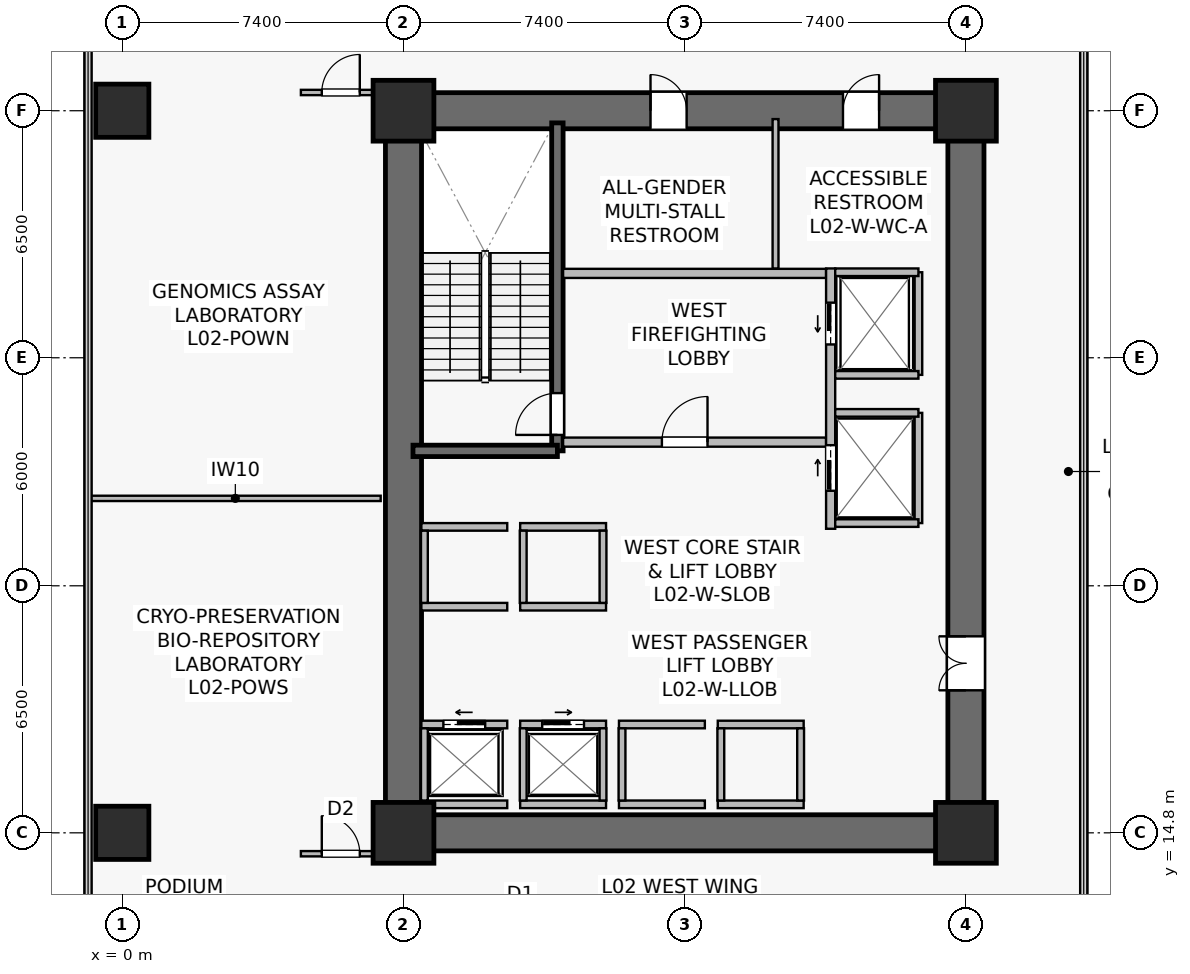
"""IFC4 building model, lengths in metres.
Left out: names, types, materials, properties, quantities, classifications, styles, units other than length and angle.
Written with IfcOpenShell. Run it as: python <this file> out.ifc"""

import sys

from ifc_helpers import new_model, si_unit, direction, frame, frame_2d, origin, origin_2d, place, context, subcontext, project, spatial, rectangle, extrude, source, transform, mapped, element, fill, save


model = new_model("IFC4")
c1 = context("Model", 3, precision=1e-05, world=origin(), true_north=direction((0.0, 1.0)))
c2 = subcontext(c1, "Body", "Model", "MODEL_VIEW")
j1 = project(units=[si_unit("LENGTHUNIT", "METRE"), si_unit("PLANEANGLEUNIT", "RADIAN")], contexts=[c1])
p1 = place(None, origin())
s1 = spatial("IfcSite", under=j1, at=p1, CompositionType="ELEMENT")
p2 = place(p1, origin())
s2 = spatial("IfcBuilding", under=s1, at=p2, CompositionType="ELEMENT")
p3 = place(p2, frame((0.0, 0.0, 5.4)))
s3 = spatial("IfcBuildingStorey", under=s2, at=p3, CompositionType="ELEMENT", Elevation=5.4)
p4 = place(p3, frame((6.925, 14.8, 0.0), z_axis=(0.0, 0.0, 1.0), x_axis=(1.0, 0.0, 0.0)))
e1 = element("IfcWall", 1, at=p4, inside=s3, PredefinedType="SHEAR", context=c2, shape_type="SweptSolid", body=[
    extrude(rectangle(XDim=15.75, YDim=0.95, at=frame_2d((7.875, 0.0))), origin(), (0.0, 0.0, 1.0), 4.45),
])
p5 = place(p3, frame((6.925, 33.8, 0.0), z_axis=(0.0, 0.0, 1.0), x_axis=(1.0, 0.0, 0.0)))
e2 = element("IfcWall", 2, at=p5, inside=s3, PredefinedType="SHEAR", context=c2, shape_type="SweptSolid", body=[
    extrude(rectangle(XDim=15.75, YDim=0.95, at=frame_2d((7.875, 0.0))), origin(), (0.0, 0.0, 1.0), 4.45),
])
p6 = place(p5, frame((6.975, 0.0, 0.0)))
e3 = element("IfcOpeningElement", 3, at=p6, cuts=e2, PredefinedType="OPENING", context=c2, shape_type="SweptSolid", body=[
    extrude(rectangle(XDim=0.95, YDim=2.15, at=frame_2d((0.475, 1.075))), frame((0.0, 0.485, 0.0), z_axis=(0.0, -1.0, 0.0), x_axis=(1.0, 0.0, 0.0)), (0.0, 0.0, 1.0), 0.97),
])
p7 = place(p5, frame((12.04, 0.0, 0.0)))
e4 = element("IfcOpeningElement", 4, at=p7, cuts=e2, PredefinedType="OPENING", context=c2, shape_type="SweptSolid", body=[
    extrude(rectangle(XDim=0.95, YDim=2.15, at=frame_2d((0.475, 1.075))), frame((0.0, 0.485, 0.0), z_axis=(0.0, -1.0, 0.0), x_axis=(1.0, 0.0, 0.0)), (0.0, 0.0, 1.0), 0.97),
])
p8 = place(p3, frame((7.4, 15.275, 0.0), z_axis=(0.0, 0.0, 1.0), x_axis=(0.0, 1.0, 0.0)))
e5 = element("IfcWall", 5, at=p8, inside=s3, PredefinedType="SHEAR", context=c2, shape_type="SweptSolid", body=[
    extrude(rectangle(XDim=18.05, YDim=0.95, at=frame_2d((9.025, 0.0))), origin(), (0.0, 0.0, 1.0), 4.45),
])
p9 = place(p3, frame((22.2, 15.275, 0.0), z_axis=(0.0, 0.0, 1.0), x_axis=(0.0, 1.0, 0.0)))
e6 = element("IfcWall", 6, at=p9, inside=s3, PredefinedType="SHEAR", context=c2, shape_type="SweptSolid", body=[
    extrude(rectangle(XDim=18.05, YDim=0.95, at=frame_2d((9.025, 0.0))), origin(), (0.0, 0.0, 1.0), 4.45),
])
p10 = place(p9, frame((3.275, 0.0, 0.0)))
e7 = element("IfcOpeningElement", 7, at=p10, cuts=e6, PredefinedType="OPENING", context=c2, shape_type="SweptSolid", body=[
    extrude(rectangle(XDim=1.42, YDim=2.2, at=frame_2d((0.71, 1.1))), frame((0.0, 0.485, 0.0), z_axis=(0.0, -1.0, 0.0), x_axis=(1.0, 0.0, 0.0)), (0.0, 0.0, 1.0), 0.97),
])
p11 = place(p3, frame((11.45, 24.85, 0.0), z_axis=(0.0, 0.0, 1.0), x_axis=(0.0, 1.0, 0.0)))
e8 = element("IfcWall", 8, at=p11, inside=s3, PredefinedType="SHEAR", context=c2, shape_type="SweptSolid", body=[
    extrude(rectangle(XDim=8.63, YDim=0.3, at=frame_2d((4.315, 0.0))), origin(), (0.0, 0.0, 1.0), 4.45),
])
p12 = place(p11, frame((0.42, 0.0, 0.0)))
e9 = element("IfcOpeningElement", 9, at=p12, cuts=e8, PredefinedType="OPENING", context=c2, shape_type="SweptSolid", body=[
    extrude(rectangle(XDim=1.1, YDim=2.15, at=frame_2d((0.55, 1.075))), frame((0.0, 0.16, 0.0), z_axis=(0.0, -1.0, 0.0), x_axis=(1.0, 0.0, 0.0)), (0.0, 0.0, 1.0), 0.32),
])
p13 = place(p3, frame((7.65, 24.85, 0.0), z_axis=(0.0, 0.0, 1.0), x_axis=(1.0, 0.0, 0.0)))
e10 = element("IfcWall", 10, at=p13, inside=s3, PredefinedType="SHEAR", context=c2, shape_type="SweptSolid", body=[
    extrude(rectangle(XDim=3.8, YDim=0.3, at=frame_2d((1.9, 0.0))), origin(), (0.0, 0.0, 1.0), 4.45),
])
m1 = source(origin(), c2, "Body", "SweptSolid", [
    extrude(rectangle(XDim=1.6, YDim=1.6, at=origin_2d()), origin(), (0.0, 0.0, 1.0), 4.8),
])
for number, where, z_axis, x_axis in (
    (11, (7.4, 14.8, 0.0), (0.0, 0.0, 1.0), (1.0, 0.0, 0.0)),
    (12, (22.2, 14.8, 0.0), (0.0, 0.0, 1.0), (1.0, 0.0, 0.0)),
    (13, (7.4, 33.8, 0.0), (0.0, 0.0, 1.0), (1.0, 0.0, 0.0)),
    (14, (22.2, 33.8, 0.0), (0.0, 0.0, 1.0), (1.0, 0.0, 0.0)),
):
    element("IfcColumn", number, at=place(p3, frame(where, z_axis=z_axis, x_axis=x_axis)), inside=s3, PredefinedType="COLUMN", context=c2, shape_type="MappedRepresentation", body=[
        mapped(m1, transform((0.0, 0.0, 0.0), scale=1.0)),
    ])
m2 = source(origin(), c2, "Body", "SweptSolid", [
    extrude(rectangle(XDim=1.4, YDim=1.4, at=origin_2d()), origin(), (0.0, 0.0, 1.0), 4.8),
])
for number, where, z_axis, x_axis in (
    (15, (0.0, 14.8, 0.0), (0.0, 0.0, 1.0), (1.0, 0.0, 0.0)),
    (16, (0.0, 33.8, 0.0), (0.0, 0.0, 1.0), (1.0, 0.0, 0.0)),
):
    element("IfcColumn", number, at=place(p3, frame(where, z_axis=z_axis, x_axis=x_axis)), inside=s3, PredefinedType="COLUMN", context=c2, shape_type="MappedRepresentation", body=[
        mapped(m2, transform((0.0, 0.0, 0.0), scale=1.0)),
    ])
p14 = place(p3, frame((11.6, 25.08, 0.0), z_axis=(0.0, 0.0, 1.0), x_axis=(1.0, 0.0, 0.0)))
e17 = element("IfcWall", 17, at=p14, inside=s3, PredefinedType="SOLIDWALL", context=c2, shape_type="SweptSolid", body=[
    extrude(rectangle(XDim=6.92, YDim=0.24, at=frame_2d((3.46, 0.0))), origin(), (0.0, 0.0, 1.0), 3.735),
])
p15 = place(p14, frame((2.6, 0.0, 0.0)))
e18 = element("IfcOpeningElement", 18, at=p15, cuts=e17, PredefinedType="OPENING", context=c2, shape_type="SweptSolid", body=[
    extrude(rectangle(XDim=1.2, YDim=2.16, at=frame_2d((0.6, 1.08))), frame((0.0, 0.13, 0.0), z_axis=(0.0, -1.0, 0.0), x_axis=(1.0, 0.0, 0.0)), (0.0, 0.0, 1.0), 0.26),
])
p16 = place(p3, frame((11.6, 29.52, 0.0), z_axis=(0.0, 0.0, 1.0), x_axis=(1.0, 0.0, 0.0)))
e19 = element("IfcWall", 19, at=p16, inside=s3, PredefinedType="SOLIDWALL", context=c2, shape_type="SweptSolid", body=[
    extrude(rectangle(XDim=6.92, YDim=0.24, at=frame_2d((3.46, 0.0))), origin(), (0.0, 0.0, 1.0), 3.735),
])
p17 = place(p3, frame((18.64, 22.8, 0.0), z_axis=(0.0, 0.0, 1.0), x_axis=(0.0, 1.0, 0.0)))
e20 = element("IfcWall", 20, at=p17, inside=s3, PredefinedType="SOLIDWALL", context=c2, shape_type="SweptSolid", body=[
    extrude(rectangle(XDim=6.85, YDim=0.24, at=frame_2d((3.425, 0.0))), origin(), (0.0, 0.0, 1.0), 3.535),
])
p18 = place(p17, frame((4.85, 0.0, 0.0)))
e21 = element("IfcOpeningElement", 21, at=p18, cuts=e20, PredefinedType="OPENING", context=c2, shape_type="SweptSolid", body=[
    extrude(rectangle(XDim=1.1, YDim=2.22, at=frame_2d((0.55, 1.11))), frame((0.0, 0.13, 0.0), z_axis=(0.0, -1.0, 0.0), x_axis=(1.0, 0.0, 0.0)), (0.0, 0.0, 1.0), 0.26),
])
p19 = place(p17, frame((1.0, 0.0, 0.0)))
e22 = element("IfcOpeningElement", 22, at=p19, cuts=e20, PredefinedType="OPENING", context=c2, shape_type="SweptSolid", body=[
    extrude(rectangle(XDim=1.2, YDim=2.22, at=frame_2d((0.6, 1.11))), frame((0.0, 0.13, 0.0), z_axis=(0.0, -1.0, 0.0), x_axis=(1.0, 0.0, 0.0)), (0.0, 0.0, 1.0), 0.26),
])
p20 = place(p3, frame((7.87, 17.65, 0.0), z_axis=(0.0, 0.0, 1.0), x_axis=(1.0, 0.0, 0.0)))
e23 = element("IfcWall", 23, at=p20, inside=s3, PredefinedType="SOLIDWALL", context=c2, shape_type="SweptSolid", body=[
    extrude(rectangle(XDim=2.26, YDim=0.2, at=frame_2d((1.13, 0.0))), origin(), (0.0, 0.0, 1.0), 4.45),
])
p21 = place(p20, frame((0.58, 0.0, 0.0)))
e24 = element("IfcOpeningElement", 24, at=p21, cuts=e23, PredefinedType="OPENING", context=c2, shape_type="SweptSolid", body=[
    extrude(rectangle(XDim=1.1, YDim=2.22, at=frame_2d((0.55, 1.11))), frame((0.0, 0.11, 0.0), z_axis=(0.0, -1.0, 0.0), x_axis=(1.0, 0.0, 0.0)), (0.0, 0.0, 1.0), 0.22),
])
p22 = place(p3, frame((7.87, 15.55, 0.0), z_axis=(0.0, 0.0, 1.0), x_axis=(1.0, 0.0, 0.0)))
e25 = element("IfcWall", 25, at=p22, inside=s3, PredefinedType="SOLIDWALL", context=c2, shape_type="SweptSolid", body=[
    extrude(rectangle(XDim=2.26, YDim=0.2, at=frame_2d((1.13, 0.0))), origin(), (0.0, 0.0, 1.0), 4.45),
])
p23 = place(p3, frame((7.95, 15.65, 0.0), z_axis=(0.0, 0.0, 1.0), x_axis=(0.0, 1.0, 0.0)))
e26 = element("IfcWall", 26, at=p23, inside=s3, PredefinedType="SOLIDWALL", context=c2, shape_type="SweptSolid", body=[
    extrude(rectangle(XDim=1.9, YDim=0.18, at=frame_2d((0.95, 0.0))), origin(), (0.0, 0.0, 1.0), 4.45),
])
p24 = place(p3, frame((10.47, 17.65, 0.0), z_axis=(0.0, 0.0, 1.0), x_axis=(1.0, 0.0, 0.0)))
e27 = element("IfcWall", 27, at=p24, inside=s3, PredefinedType="SOLIDWALL", context=c2, shape_type="SweptSolid", body=[
    extrude(rectangle(XDim=2.26, YDim=0.2, at=frame_2d((1.13, 0.0))), origin(), (0.0, 0.0, 1.0), 4.45),
])
p25 = place(p24, frame((0.58, 0.0, 0.0)))
e28 = element("IfcOpeningElement", 28, at=p25, cuts=e27, PredefinedType="OPENING", context=c2, shape_type="SweptSolid", body=[
    extrude(rectangle(XDim=1.1, YDim=2.22, at=frame_2d((0.55, 1.11))), frame((0.0, 0.11, 0.0), z_axis=(0.0, -1.0, 0.0), x_axis=(1.0, 0.0, 0.0)), (0.0, 0.0, 1.0), 0.22),
])
p26 = place(p3, frame((10.47, 15.55, 0.0), z_axis=(0.0, 0.0, 1.0), x_axis=(1.0, 0.0, 0.0)))
e29 = element("IfcWall", 29, at=p26, inside=s3, PredefinedType="SOLIDWALL", context=c2, shape_type="SweptSolid", body=[
    extrude(rectangle(XDim=2.26, YDim=0.2, at=frame_2d((1.13, 0.0))), origin(), (0.0, 0.0, 1.0), 4.45),
])
for number, where, z_axis, x_axis in (
    (30, (10.55, 15.65, 0.0), (0.0, 0.0, 1.0), (0.0, 1.0, 0.0)),
    (31, (12.65, 15.65, 0.0), (0.0, 0.0, 1.0), (0.0, 1.0, 0.0)),
):
    element("IfcWall", number, at=place(p3, frame(where, z_axis=z_axis, x_axis=x_axis)), inside=s3, PredefinedType="SOLIDWALL", context=c2, shape_type="SweptSolid", body=[
        extrude(rectangle(XDim=1.9, YDim=0.18, at=frame_2d((0.95, 0.0))), origin(), (0.0, 0.0, 1.0), 4.45),
    ])
for number, where, z_axis, x_axis in (
    (32, (13.07, 17.65, 0.0), (0.0, 0.0, 1.0), (1.0, 0.0, 0.0)),
    (33, (13.07, 15.55, 0.0), (0.0, 0.0, 1.0), (1.0, 0.0, 0.0)),
):
    element("IfcWall", number, at=place(p3, frame(where, z_axis=z_axis, x_axis=x_axis)), inside=s3, PredefinedType="SOLIDWALL", context=c2, shape_type="SweptSolid", body=[
        extrude(rectangle(XDim=2.26, YDim=0.2, at=frame_2d((1.13, 0.0))), origin(), (0.0, 0.0, 1.0), 3.735),
    ])
p27 = place(p3, frame((13.15, 15.65, 0.0), z_axis=(0.0, 0.0, 1.0), x_axis=(0.0, 1.0, 0.0)))
e34 = element("IfcWall", 34, at=p27, inside=s3, PredefinedType="SOLIDWALL", context=c2, shape_type="SweptSolid", body=[
    extrude(rectangle(XDim=1.9, YDim=0.18, at=frame_2d((0.95, 0.0))), origin(), (0.0, 0.0, 1.0), 4.45),
])
for number, where, z_axis, x_axis in (
    (35, (15.67, 17.65, 0.0), (0.0, 0.0, 1.0), (1.0, 0.0, 0.0)),
    (36, (15.67, 15.55, 0.0), (0.0, 0.0, 1.0), (1.0, 0.0, 0.0)),
):
    element("IfcWall", number, at=place(p3, frame(where, z_axis=z_axis, x_axis=x_axis)), inside=s3, PredefinedType="SOLIDWALL", context=c2, shape_type="SweptSolid", body=[
        extrude(rectangle(XDim=2.26, YDim=0.2, at=frame_2d((1.13, 0.0))), origin(), (0.0, 0.0, 1.0), 4.45),
    ])
for number, where, z_axis, x_axis in (
    (37, (15.75, 15.65, 0.0), (0.0, 0.0, 1.0), (0.0, 1.0, 0.0)),
    (38, (17.85, 15.65, 0.0), (0.0, 0.0, 1.0), (0.0, 1.0, 0.0)),
):
    element("IfcWall", number, at=place(p3, frame(where, z_axis=z_axis, x_axis=x_axis)), inside=s3, PredefinedType="SOLIDWALL", context=c2, shape_type="SweptSolid", body=[
        extrude(rectangle(XDim=1.9, YDim=0.18, at=frame_2d((0.95, 0.0))), origin(), (0.0, 0.0, 1.0), 4.45),
    ])
for number, where, z_axis, x_axis in (
    (39, (7.87, 20.75, 0.0), (0.0, 0.0, 1.0), (1.0, 0.0, 0.0)),
    (40, (7.87, 22.85, 0.0), (0.0, 0.0, 1.0), (1.0, 0.0, 0.0)),
):
    element("IfcWall", number, at=place(p3, frame(where, z_axis=z_axis, x_axis=x_axis)), inside=s3, PredefinedType="SOLIDWALL", context=c2, shape_type="SweptSolid", body=[
        extrude(rectangle(XDim=2.26, YDim=0.2, at=frame_2d((1.13, 0.0))), origin(), (0.0, 0.0, 1.0), 4.45),
    ])
p28 = place(p3, frame((7.95, 20.85, 0.0), z_axis=(0.0, 0.0, 1.0), x_axis=(0.0, 1.0, 0.0)))
e41 = element("IfcWall", 41, at=p28, inside=s3, PredefinedType="SOLIDWALL", context=c2, shape_type="SweptSolid", body=[
    extrude(rectangle(XDim=1.9, YDim=0.18, at=frame_2d((0.95, 0.0))), origin(), (0.0, 0.0, 1.0), 4.45),
])
for number, where, z_axis, x_axis in (
    (42, (10.47, 20.75, 0.0), (0.0, 0.0, 1.0), (1.0, 0.0, 0.0)),
    (43, (10.47, 22.85, 0.0), (0.0, 0.0, 1.0), (1.0, 0.0, 0.0)),
):
    element("IfcWall", number, at=place(p3, frame(where, z_axis=z_axis, x_axis=x_axis)), inside=s3, PredefinedType="SOLIDWALL", context=c2, shape_type="SweptSolid", body=[
        extrude(rectangle(XDim=2.26, YDim=0.2, at=frame_2d((1.13, 0.0))), origin(), (0.0, 0.0, 1.0), 4.45),
    ])
for number, where, z_axis, x_axis in (
    (44, (10.55, 20.85, 0.0), (0.0, 0.0, 1.0), (0.0, 1.0, 0.0)),
    (45, (12.65, 20.85, 0.0), (0.0, 0.0, 1.0), (0.0, 1.0, 0.0)),
):
    element("IfcWall", number, at=place(p3, frame(where, z_axis=z_axis, x_axis=x_axis)), inside=s3, PredefinedType="SOLIDWALL", context=c2, shape_type="SweptSolid", body=[
        extrude(rectangle(XDim=1.9, YDim=0.18, at=frame_2d((0.95, 0.0))), origin(), (0.0, 0.0, 1.0), 4.45),
    ])
p29 = place(p3, frame((20.95, 26.85, 0.0), z_axis=(0.0, 0.0, 1.0), x_axis=(0.0, 1.0, 0.0)))
e46 = element("IfcWall", 46, at=p29, inside=s3, PredefinedType="SOLIDWALL", context=c2, shape_type="SweptSolid", body=[
    extrude(rectangle(XDim=2.7, YDim=0.2, at=frame_2d((1.35, 0.0))), origin(), (0.0, 0.0, 1.0), 4.45),
])
p30 = place(p3, frame((18.76, 29.55, 0.0), z_axis=(0.0, 0.0, 1.0), x_axis=(1.0, 0.0, 0.0)))
e47 = element("IfcWall", 47, at=p30, inside=s3, PredefinedType="SOLIDWALL", context=c2, shape_type="SweptSolid", body=[
    extrude(rectangle(XDim=2.19, YDim=0.2, at=frame_2d((1.095, 0.0))), origin(), (0.0, 0.0, 1.0), 4.45),
])
p31 = place(p3, frame((18.76, 26.85, 0.0), z_axis=(0.0, 0.0, 1.0), x_axis=(1.0, 0.0, 0.0)))
e48 = element("IfcWall", 48, at=p31, inside=s3, PredefinedType="SOLIDWALL", context=c2, shape_type="SweptSolid", body=[
    extrude(rectangle(XDim=2.19, YDim=0.2, at=frame_2d((1.095, 0.0))), origin(), (0.0, 0.0, 1.0), 3.847),
])
p32 = place(p3, frame((20.95, 22.95, 0.0), z_axis=(0.0, 0.0, 1.0), x_axis=(0.0, 1.0, 0.0)))
e49 = element("IfcWall", 49, at=p32, inside=s3, PredefinedType="SOLIDWALL", context=c2, shape_type="SweptSolid", body=[
    extrude(rectangle(XDim=2.9, YDim=0.2, at=frame_2d((1.45, 0.0))), origin(), (0.0, 0.0, 1.0), 3.535),
])
for number, where, z_axis, x_axis in (
    (50, (18.76, 25.85, 0.0), (0.0, 0.0, 1.0), (1.0, 0.0, 0.0)),
    (51, (18.76, 22.95, 0.0), (0.0, 0.0, 1.0), (1.0, 0.0, 0.0)),
):
    element("IfcWall", number, at=place(p3, frame(where, z_axis=z_axis, x_axis=x_axis)), inside=s3, PredefinedType="SOLIDWALL", context=c2, shape_type="SweptSolid", body=[
        extrude(rectangle(XDim=2.19, YDim=0.2, at=frame_2d((1.095, 0.0))), origin(), (0.0, 0.0, 1.0), 4.45),
    ])
p33 = place(p3, frame((17.19, 29.65, 0.0), z_axis=(0.0, 0.0, 1.0), x_axis=(0.0, 1.0, 0.0)))
e52 = element("IfcWall", 52, at=p33, inside=s3, PredefinedType="PLUMBINGWALL", context=c2, shape_type="SweptSolid", body=[
    extrude(rectangle(XDim=3.93, YDim=0.155, at=frame_2d((1.965, 0.0))), origin(), (0.0, 0.0, 1.0), 4.45),
])
p34 = place(p3, frame((-0.85, 23.6, 0.0), z_axis=(0.0, 0.0, 1.0), x_axis=(1.0, 0.0, 0.0)))
e53 = element("IfcWall", 53, at=p34, inside=s3, PredefinedType="PARTITIONING", context=c2, shape_type="SweptSolid", body=[
    extrude(rectangle(XDim=7.65, YDim=0.14, at=frame_2d((3.825, 0.0))), origin(), (0.0, 0.0, 1.0), 3.835),
])
p35 = place(p3, frame((4.7, 14.25, 0.0), z_axis=(0.0, 0.0, 1.0), x_axis=(1.0, 0.0, 0.0)))
e54 = element("IfcWall", 54, at=p35, inside=s3, PredefinedType="PARTITIONING", context=c2, shape_type="SweptSolid", body=[
    extrude(rectangle(XDim=2.1, YDim=0.14, at=frame_2d((1.05, 0.0))), origin(), (0.0, 0.0, 1.0), 4.45),
])
p36 = place(p35, frame((0.55, 0.0, 0.0)))
e55 = element("IfcOpeningElement", 55, at=p36, cuts=e54, PredefinedType="OPENING", context=c2, shape_type="SweptSolid", body=[
    extrude(rectangle(XDim=1.0, YDim=2.15, at=frame_2d((0.5, 1.075))), frame((0.0, 0.08, 0.0), z_axis=(0.0, -1.0, 0.0), x_axis=(1.0, 0.0, 0.0)), (0.0, 0.0, 1.0), 0.16),
])
p37 = place(p3, frame((4.7, 34.28, 0.0), z_axis=(0.0, 0.0, 1.0), x_axis=(1.0, 0.0, 0.0)))
e56 = element("IfcWall", 56, at=p37, inside=s3, PredefinedType="PARTITIONING", context=c2, shape_type="SweptSolid", body=[
    extrude(rectangle(XDim=2.1, YDim=0.14, at=frame_2d((1.05, 0.0))), origin(), (0.0, 0.0, 1.0), 4.45),
])
p38 = place(p37, frame((0.55, 0.0, 0.0)))
e57 = element("IfcOpeningElement", 57, at=p38, cuts=e56, PredefinedType="OPENING", context=c2, shape_type="SweptSolid", body=[
    extrude(rectangle(XDim=1.0, YDim=2.15, at=frame_2d((0.5, 1.075))), frame((0.0, 0.08, 0.0), z_axis=(0.0, -1.0, 0.0), x_axis=(1.0, 0.0, 0.0)), (0.0, 0.0, 1.0), 0.16),
])
m3 = source(origin(), c2, "Body", "SweptSolid", [
    extrude(rectangle(XDim=1.1, YDim=2.15, at=frame_2d((0.55, 1.075))), frame((0.0, 0.025, 0.0), z_axis=(0.0, -1.0, 0.0), x_axis=(1.0, 0.0, 0.0)), (0.0, 0.0, 1.0), 0.05),
])
p39 = place(p12, origin())
e58 = element("IfcDoor", 58, at=p39, inside=s3, OperationType="SINGLE_SWING_LEFT", PredefinedType="DOOR", context=c2, shape_type="MappedRepresentation", body=[
    mapped(m3, transform((0.0, 0.0, 0.0), scale=1.0)),
])
fill(e9, e58)
m4 = source(origin(), c2, "Body", "SweptSolid", [
    extrude(rectangle(XDim=1.2, YDim=2.16, at=frame_2d((0.6, 1.08))), frame((0.0, 0.025, 0.0), z_axis=(0.0, -1.0, 0.0), x_axis=(1.0, 0.0, 0.0)), (0.0, 0.0, 1.0), 0.05),
])
p40 = place(p15, origin())
e59 = element("IfcDoor", 59, at=p40, inside=s3, OperationType="SINGLE_SWING_RIGHT", PredefinedType="DOOR", context=c2, shape_type="MappedRepresentation", body=[
    mapped(m4, transform((0.0, 0.0, 0.0), scale=1.0)),
])
fill(e18, e59)
m5 = source(origin(), c2, "Body", "SweptSolid", [
    extrude(rectangle(XDim=1.1, YDim=2.22, at=frame_2d((0.55, 1.11))), frame((0.0, 0.025, 0.0), z_axis=(0.0, -1.0, 0.0), x_axis=(1.0, 0.0, 0.0)), (0.0, 0.0, 1.0), 0.05),
])
p41 = place(p21, origin())
e60 = element("IfcDoor", 60, at=p41, inside=s3, OperationType="SLIDING_TO_LEFT", PredefinedType="USERDEFINED", context=c2, shape_type="MappedRepresentation", body=[
    mapped(m5, transform((0.0, 0.0, 0.0), scale=1.0)),
])
fill(e24, e60)
p42 = place(p25, origin())
e61 = element("IfcDoor", 61, at=p42, inside=s3, OperationType="SLIDING_TO_RIGHT", PredefinedType="USERDEFINED", context=c2, shape_type="MappedRepresentation", body=[
    mapped(m5, transform((0.0, 0.0, 0.0), scale=1.0)),
])
fill(e28, e61)
p43 = place(p18, origin())
e62 = element("IfcDoor", 62, at=p43, inside=s3, OperationType="SLIDING_TO_LEFT", PredefinedType="USERDEFINED", context=c2, shape_type="MappedRepresentation", body=[
    mapped(m5, transform((0.0, 0.0, 0.0), scale=1.0)),
])
fill(e21, e62)
m6 = source(origin(), c2, "Body", "SweptSolid", [
    extrude(rectangle(XDim=1.2, YDim=2.22, at=frame_2d((0.6, 1.11))), frame((0.0, 0.025, 0.0), z_axis=(0.0, -1.0, 0.0), x_axis=(1.0, 0.0, 0.0)), (0.0, 0.0, 1.0), 0.05),
])
p44 = place(p19, origin())
e63 = element("IfcDoor", 63, at=p44, inside=s3, OperationType="SLIDING_TO_RIGHT", PredefinedType="USERDEFINED", context=c2, shape_type="MappedRepresentation", body=[
    mapped(m6, transform((0.0, 0.0, 0.0), scale=1.0)),
])
fill(e22, e63)
m7 = source(origin(), c2, "Body", "SweptSolid", [
    extrude(rectangle(XDim=1.42, YDim=2.2, at=frame_2d((0.71, 1.1))), frame((0.0, 0.025, 0.0), z_axis=(0.0, -1.0, 0.0), x_axis=(1.0, 0.0, 0.0)), (0.0, 0.0, 1.0), 0.05),
])
p45 = place(p10, origin())
e64 = element("IfcDoor", 64, at=p45, inside=s3, OperationType="DOUBLE_DOOR_SINGLE_SWING", PredefinedType="DOOR", context=c2, shape_type="MappedRepresentation", body=[
    mapped(m7, transform((0.0, 0.0, 0.0), scale=1.0)),
])
fill(e7, e64)
m8 = source(origin(), c2, "Body", "SweptSolid", [
    extrude(rectangle(XDim=0.95, YDim=2.15, at=frame_2d((0.475, 1.075))), frame((0.0, 0.025, 0.0), z_axis=(0.0, -1.0, 0.0), x_axis=(1.0, 0.0, 0.0)), (0.0, 0.0, 1.0), 0.05),
])
p46 = place(p6, origin())
e65 = element("IfcDoor", 65, at=p46, inside=s3, OperationType="SINGLE_SWING_LEFT", PredefinedType="DOOR", context=c2, shape_type="MappedRepresentation", body=[
    mapped(m8, transform((0.0, 0.0, 0.0), scale=1.0)),
])
fill(e3, e65)
p47 = place(p7, origin())
e66 = element("IfcDoor", 66, at=p47, inside=s3, OperationType="SINGLE_SWING_RIGHT", PredefinedType="DOOR", context=c2, shape_type="MappedRepresentation", body=[
    mapped(m8, transform((0.0, 0.0, 0.0), scale=1.0)),
])
fill(e4, e66)
m9 = source(origin(), c2, "Body", "SweptSolid", [
    extrude(rectangle(XDim=1.0, YDim=2.15, at=frame_2d((0.5, 1.075))), frame((0.0, 0.025, 0.0), z_axis=(0.0, -1.0, 0.0), x_axis=(1.0, 0.0, 0.0)), (0.0, 0.0, 1.0), 0.05),
])
p48 = place(p36, origin())
e67 = element("IfcDoor", 67, at=p48, inside=s3, OperationType="SINGLE_SWING_LEFT", PredefinedType="DOOR", context=c2, shape_type="MappedRepresentation", body=[
    mapped(m9, transform((0.0, 0.0, 0.0), scale=1.0)),
])
fill(e55, e67)
p49 = place(p38, origin())
e68 = element("IfcDoor", 68, at=p49, inside=s3, OperationType="SINGLE_SWING_RIGHT", PredefinedType="DOOR", context=c2, shape_type="MappedRepresentation", body=[
    mapped(m9, transform((0.0, 0.0, 0.0), scale=1.0)),
])
fill(e57, e68)
save(model, sys.argv[1])
